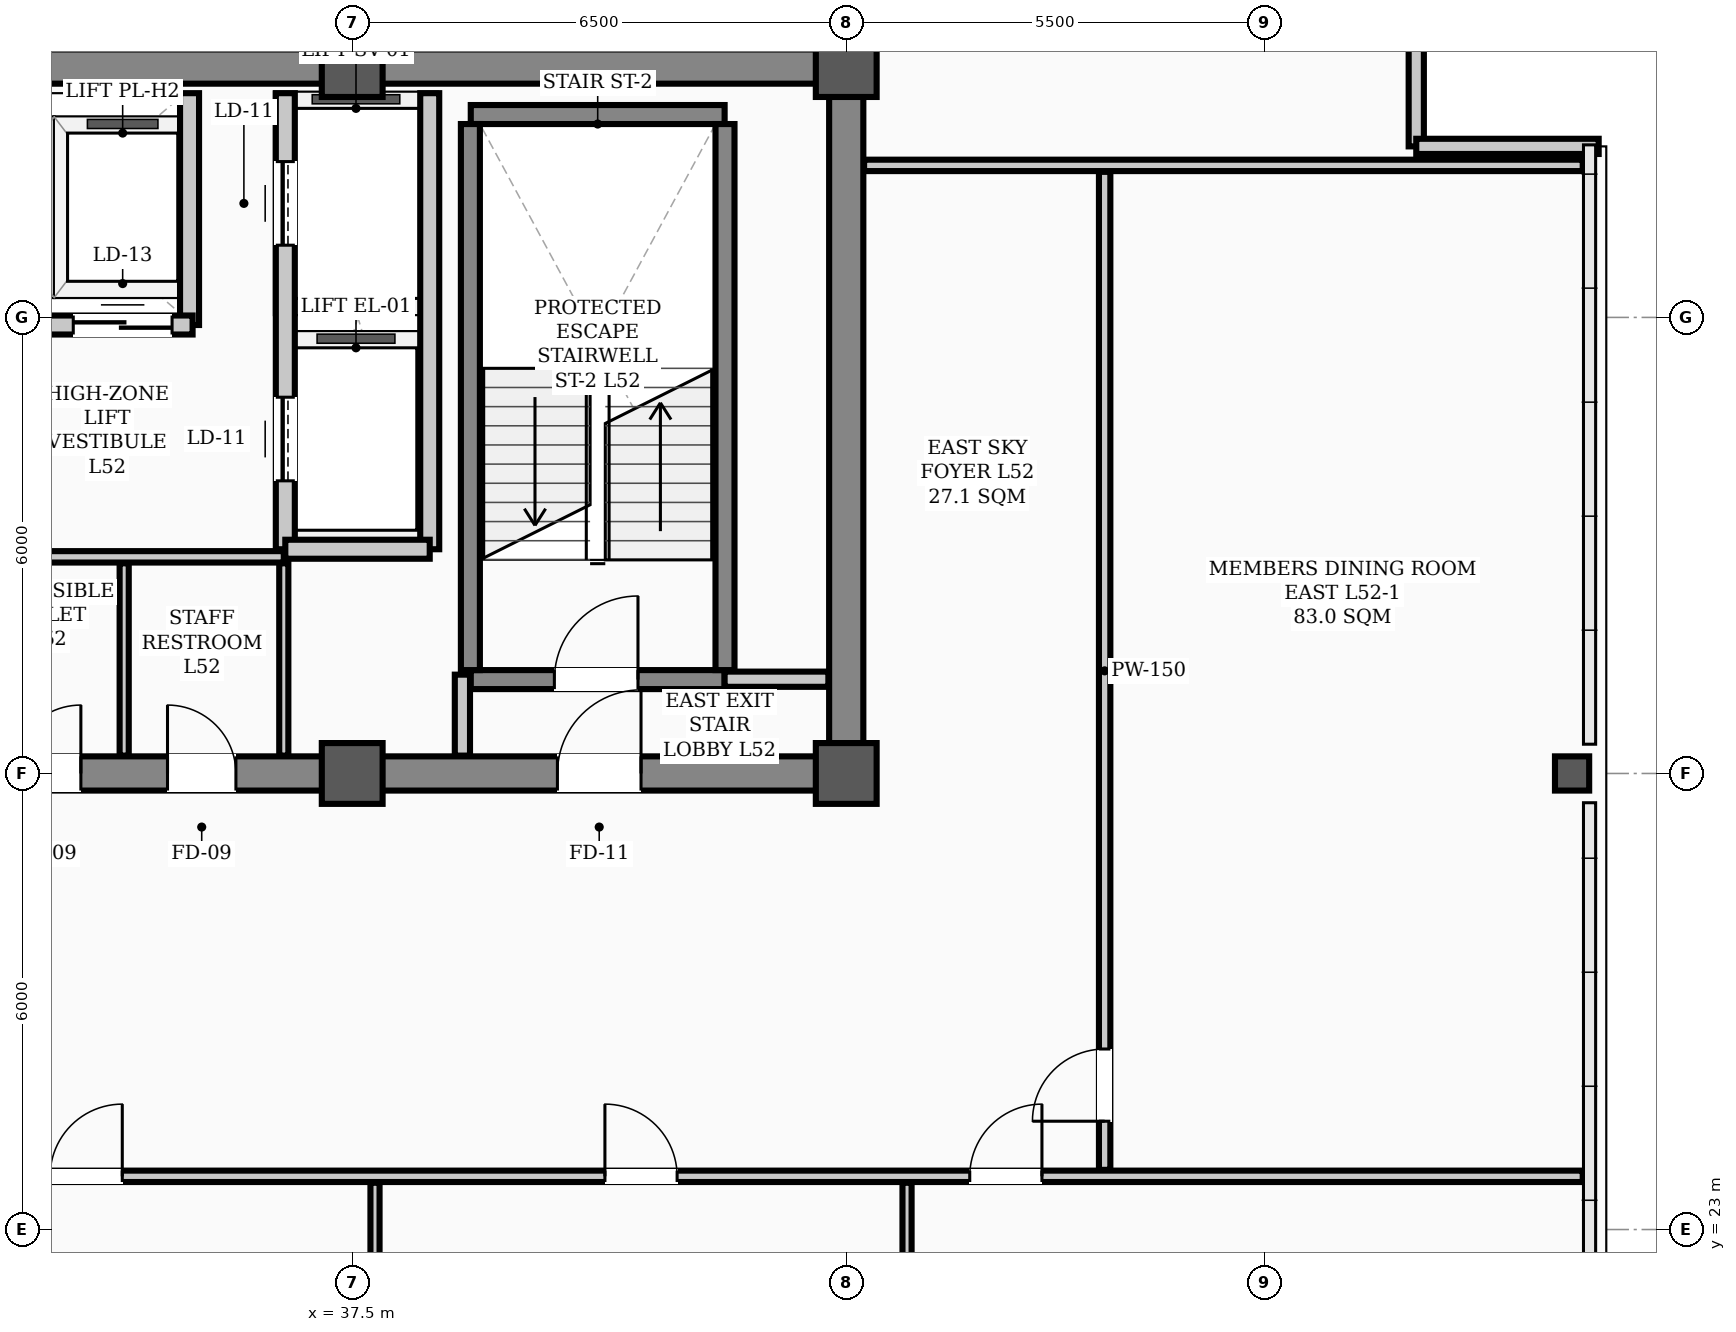
"""IFC4 building model, lengths in metres.
Left out: names, types, materials, properties, quantities, classifications, styles, units other than length and angle.
Written with IfcOpenShell. Run it as: python <this file> out.ifc"""

import sys

from ifc_helpers import new_model, si_unit, direction, frame, frame_2d, origin, origin_2d, place, context, subcontext, project, spatial, rectangle, hollow_rectangle, extrude, element, fill, save


model = new_model("IFC4")
c1 = context("Model", 3, precision=1e-05, world=origin(), true_north=direction((0.0, 1.0)))
c2 = subcontext(c1, "Body", "Model", "MODEL_VIEW")
j1 = project(units=[si_unit("LENGTHUNIT", "METRE"), si_unit("PLANEANGLEUNIT", "RADIAN")], contexts=[c1])
p1 = place(None, origin())
s1 = spatial("IfcSite", under=j1, at=p1, CompositionType="ELEMENT")
p2 = place(p1, origin())
s2 = spatial("IfcBuilding", under=s1, at=p2, CompositionType="ELEMENT")
p3 = place(p2, frame((0.0, 0.0, 211.1)))
s3 = spatial("IfcBuildingStorey", under=s2, at=p3, CompositionType="ELEMENT", Elevation=211.1)
for number, where, z_axis, x_axis in (
    (1, (37.5, 29.0, 0.0), (0.0, 0.0, 1.0), (1.0, 0.0, 0.0)),
    (2, (37.5, 38.3, 0.0), (0.0, 0.0, 1.0), (1.0, 0.0, 0.0)),
    (3, (44.0, 29.0, 0.0), (0.0, 0.0, 1.0), (1.0, 0.0, 0.0)),
    (4, (44.0, 38.3, 0.0), (0.0, 0.0, 1.0), (1.0, 0.0, 0.0)),
):
    element("IfcColumn", number, at=place(p3, frame(where, z_axis=z_axis, x_axis=x_axis)), inside=s3, PredefinedType="COLUMN", context=c2, shape_type="SweptSolid", body=[
        extrude(hollow_rectangle(XDim=0.8, YDim=0.8, WallThickness=0.032, InnerFilletRadius=0.016, OuterFilletRadius=0.048, at=origin_2d()), origin(), (0.0, 0.0, 1.0), 3.9),
    ])
p4 = place(p3, frame((53.55, 29.0, 0.0), z_axis=(0.0, 0.0, 1.0), x_axis=(1.0, 0.0, 0.0)))
e5 = element("IfcColumn", 5, at=p4, inside=s3, PredefinedType="COLUMN", context=c2, shape_type="SweptSolid", body=[
    extrude(hollow_rectangle(XDim=0.45, YDim=0.45, WallThickness=0.022, InnerFilletRadius=0.022, OuterFilletRadius=0.044, at=origin_2d()), origin(), (0.0, 0.0, 1.0), 3.9),
])
for number, where, z_axis, x_axis in (
    (6, (51.5, 39.65, 0.0), (0.0, 0.0, 1.0), (0.0, -1.0, 0.0)),
    (7, (51.5, 37.25, 0.0), (0.0, 0.0, 1.0), (1.0, 0.0, 0.0)),
):
    element("IfcWall", number, at=place(p3, frame(where, z_axis=z_axis, x_axis=x_axis)), inside=s3, PredefinedType="PARAPET", context=c2, shape_type="SweptSolid", body=[
        extrude(rectangle(XDim=2.4, YDim=0.2, at=frame_2d((1.2, 0.0))), origin(), (0.0, 0.0, 1.0), 1.2),
    ])
p5 = place(p3, frame((13.5, 29.0, 0.0), z_axis=(0.0, 0.0, 1.0), x_axis=(1.0, 0.0, 0.0)))
e8 = element("IfcWall", 8, at=p5, inside=s3, PredefinedType="SHEAR", context=c2, shape_type="SweptSolid", body=[
    extrude(rectangle(XDim=30.5, YDim=0.45, at=frame_2d((15.25, 0.0))), origin(), (0.0, 0.0, 1.0), 3.72),
])
p6 = place(p5, frame((1.75, 0.0, 0.0)))
e9 = element("IfcOpeningElement", 9, at=p6, cuts=e8, PredefinedType="OPENING", context=c2, shape_type="SweptSolid", body=[
    extrude(rectangle(XDim=1.1, YDim=2.08, at=frame_2d((0.55, 1.04))), frame((0.0, 0.235, 0.0), z_axis=(0.0, -1.0, 0.0), x_axis=(1.0, 0.0, 0.0)), (0.0, 0.0, 1.0), 0.47),
])
p7 = place(p5, frame((26.7, 0.0, 0.0)))
e10 = element("IfcOpeningElement", 10, at=p7, cuts=e8, PredefinedType="OPENING", context=c2, shape_type="SweptSolid", body=[
    extrude(rectangle(XDim=1.1, YDim=2.08, at=frame_2d((0.55, 1.04))), frame((0.0, 0.235, 0.0), z_axis=(0.0, -1.0, 0.0), x_axis=(1.0, 0.0, 0.0)), (0.0, 0.0, 1.0), 0.47),
])
p8 = place(p5, frame((6.8, 0.0, 0.0)))
e11 = element("IfcOpeningElement", 11, at=p8, cuts=e8, PredefinedType="OPENING", context=c2, shape_type="SweptSolid", body=[
    extrude(rectangle(XDim=1.1, YDim=2.08, at=frame_2d((0.55, 1.04))), frame((0.0, 0.235, 0.0), z_axis=(0.0, -1.0, 0.0), x_axis=(1.0, 0.0, 0.0)), (0.0, 0.0, 1.0), 0.47),
])
p9 = place(p5, frame((13.2, 0.0, 0.0)))
e12 = element("IfcOpeningElement", 12, at=p9, cuts=e8, PredefinedType="OPENING", context=c2, shape_type="SweptSolid", body=[
    extrude(rectangle(XDim=1.6, YDim=2.08, at=frame_2d((0.8, 1.04))), frame((0.0, 0.235, 0.0), z_axis=(0.0, -1.0, 0.0), x_axis=(1.0, 0.0, 0.0)), (0.0, 0.0, 1.0), 0.47),
])
p10 = place(p5, frame((19.53, 0.0, 0.0)))
e13 = element("IfcOpeningElement", 13, at=p10, cuts=e8, PredefinedType="OPENING", context=c2, shape_type="SweptSolid", body=[
    extrude(rectangle(XDim=0.9, YDim=2.08, at=frame_2d((0.45, 1.04))), frame((0.0, 0.235, 0.0), z_axis=(0.0, -1.0, 0.0), x_axis=(1.0, 0.0, 0.0)), (0.0, 0.0, 1.0), 0.47),
])
p11 = place(p5, frame((21.57, 0.0, 0.0)))
e14 = element("IfcOpeningElement", 14, at=p11, cuts=e8, PredefinedType="OPENING", context=c2, shape_type="SweptSolid", body=[
    extrude(rectangle(XDim=0.9, YDim=2.08, at=frame_2d((0.45, 1.04))), frame((0.0, 0.235, 0.0), z_axis=(0.0, -1.0, 0.0), x_axis=(1.0, 0.0, 0.0)), (0.0, 0.0, 1.0), 0.47),
])
p12 = place(p3, frame((13.5, 38.3, 0.0), z_axis=(0.0, 0.0, 1.0), x_axis=(1.0, 0.0, 0.0)))
e15 = element("IfcWall", 15, at=p12, inside=s3, PredefinedType="SHEAR", context=c2, shape_type="SweptSolid", body=[
    extrude(rectangle(XDim=30.5, YDim=0.45, at=frame_2d((15.25, 0.0))), origin(), (0.0, 0.0, 1.0), 3.72),
])
p13 = place(p3, frame((44.0, 29.35, 0.0), z_axis=(0.0, 0.0, 1.0), x_axis=(0.0, 1.0, 0.0)))
e16 = element("IfcWall", 16, at=p13, inside=s3, PredefinedType="SHEAR", context=c2, shape_type="SweptSolid", body=[
    extrude(rectangle(XDim=8.6, YDim=0.45, at=frame_2d((4.3, 0.0))), origin(), (0.0, 0.0, 1.0), 3.72),
])
p14 = place(p3, frame((39.06, 30.235, 0.0), z_axis=(0.0, 0.0, 1.0), x_axis=(1.0, 0.0, 0.0)))
e17 = element("IfcWall", 17, at=p14, inside=s3, PredefinedType="STANDARD", context=c2, shape_type="SweptSolid", body=[
    extrude(rectangle(XDim=3.34, YDim=0.25, at=frame_2d((1.67, 0.0))), origin(), (0.0, 0.0, 1.0), 3.72),
])
p15 = place(p14, frame((1.1, 0.0, 0.0)))
e18 = element("IfcOpeningElement", 18, at=p15, cuts=e17, PredefinedType="OPENING", context=c2, shape_type="SweptSolid", body=[
    extrude(rectangle(XDim=1.1, YDim=2.08, at=frame_2d((0.55, 1.04))), frame((0.0, 0.135, 0.0), z_axis=(0.0, -1.0, 0.0), x_axis=(1.0, 0.0, 0.0)), (0.0, 0.0, 1.0), 0.27),
])
p16 = place(p3, frame((39.06, 37.669, 0.0), z_axis=(0.0, 0.0, 1.0), x_axis=(1.0, 0.0, 0.0)))
e19 = element("IfcWall", 19, at=p16, inside=s3, PredefinedType="STANDARD", context=c2, shape_type="SweptSolid", body=[
    extrude(rectangle(XDim=3.34, YDim=0.25, at=frame_2d((1.67, 0.0))), origin(), (0.0, 0.0, 1.0), 3.72),
])
for number, where, z_axis, x_axis in (
    (20, (39.055, 30.36, 0.0), (0.0, 0.0, 1.0), (0.0, 1.0, 0.0)),
    (21, (42.405, 30.36, 0.0), (0.0, 0.0, 1.0), (0.0, 1.0, 0.0)),
):
    element("IfcWall", number, at=place(p3, frame(where, z_axis=z_axis, x_axis=x_axis)), inside=s3, PredefinedType="STANDARD", context=c2, shape_type="SweptSolid", body=[
        extrude(rectangle(XDim=7.184, YDim=0.25, at=frame_2d((3.592, 0.0))), origin(), (0.0, 0.0, 1.0), 3.72),
    ])
p17 = place(p3, frame((36.62, 31.95, 0.0), z_axis=(0.0, 0.0, 1.0), x_axis=(0.0, 1.0, 0.0)))
e22 = element("IfcWall", 22, at=p17, inside=s3, PredefinedType="STANDARD", context=c2, shape_type="SweptSolid", body=[
    extrude(rectangle(XDim=6.0, YDim=0.25, at=frame_2d((3.0, 0.0))), origin(), (0.0, 0.0, 1.0), 3.72),
])
p18 = place(p17, frame((0.9, 0.0, 0.0)))
e23 = element("IfcOpeningElement", 23, at=p18, cuts=e22, PredefinedType="OPENING", context=c2, shape_type="SweptSolid", body=[
    extrude(rectangle(XDim=1.1, YDim=2.08, at=frame_2d((0.55, 1.04))), frame((0.0, 0.135, 0.0), z_axis=(0.0, -1.0, 0.0), x_axis=(1.0, 0.0, 0.0)), (0.0, 0.0, 1.0), 0.27),
])
p19 = place(p17, frame((4.0, 0.0, 0.0)))
e24 = element("IfcOpeningElement", 24, at=p19, cuts=e22, PredefinedType="OPENING", context=c2, shape_type="SweptSolid", body=[
    extrude(rectangle(XDim=1.1, YDim=2.08, at=frame_2d((0.55, 1.04))), frame((0.0, 0.135, 0.0), z_axis=(0.0, -1.0, 0.0), x_axis=(1.0, 0.0, 0.0)), (0.0, 0.0, 1.0), 0.27),
])
p20 = place(p3, frame((38.52, 31.95, 0.0), z_axis=(0.0, 0.0, 1.0), x_axis=(0.0, 1.0, 0.0)))
e25 = element("IfcWall", 25, at=p20, inside=s3, PredefinedType="STANDARD", context=c2, shape_type="SweptSolid", body=[
    extrude(rectangle(XDim=6.0, YDim=0.25, at=frame_2d((3.0, 0.0))), origin(), (0.0, 0.0, 1.0), 3.48),
])
p21 = place(p3, frame((36.62, 31.95, 0.0), z_axis=(0.0, 0.0, 1.0), x_axis=(1.0, 0.0, 0.0)))
e26 = element("IfcWall", 26, at=p21, inside=s3, PredefinedType="STANDARD", context=c2, shape_type="SweptSolid", body=[
    extrude(rectangle(XDim=1.9, YDim=0.25, at=frame_2d((0.95, 0.0))), origin(), (0.0, 0.0, 1.0), 3.48),
])
p22 = place(p3, frame((35.36, 34.9, 0.0), z_axis=(0.0, 0.0, 1.0), x_axis=(0.0, 1.0, 0.0)))
e27 = element("IfcWall", 27, at=p22, inside=s3, PredefinedType="STANDARD", context=c2, shape_type="SweptSolid", body=[
    extrude(rectangle(XDim=3.05, YDim=0.25, at=frame_2d((1.525, 0.0))), origin(), (0.0, 0.0, 1.0), 3.72),
])
p23 = place(p3, frame((31.8, 34.9, 0.0), z_axis=(0.0, 0.0, 1.0), x_axis=(1.0, 0.0, 0.0)))
e28 = element("IfcWall", 28, at=p23, inside=s3, PredefinedType="STANDARD", context=c2, shape_type="SweptSolid", body=[
    extrude(rectangle(XDim=3.6, YDim=0.25, at=frame_2d((1.8, 0.0))), origin(), (0.0, 0.0, 1.0), 3.72),
])
p24 = place(p23, frame((0.23, 0.0, 0.0)))
e29 = element("IfcOpeningElement", 29, at=p24, cuts=e28, PredefinedType="OPENING", context=c2, shape_type="SweptSolid", body=[
    extrude(rectangle(XDim=1.3, YDim=2.08, at=frame_2d((0.65, 1.04))), frame((0.0, 0.135, 0.0), z_axis=(0.0, -1.0, 0.0), x_axis=(1.0, 0.0, 0.0)), (0.0, 0.0, 1.0), 0.27),
])
p25 = place(p23, frame((2.03, 0.0, 0.0)))
e30 = element("IfcOpeningElement", 30, at=p25, cuts=e28, PredefinedType="OPENING", context=c2, shape_type="SweptSolid", body=[
    extrude(rectangle(XDim=1.3, YDim=2.08, at=frame_2d((0.65, 1.04))), frame((0.0, 0.135, 0.0), z_axis=(0.0, -1.0, 0.0), x_axis=(1.0, 0.0, 0.0)), (0.0, 0.0, 1.0), 0.27),
])
p26 = place(p3, frame((42.4, 30.24, 0.0), z_axis=(0.0, 0.0, 1.0), x_axis=(1.0, 0.0, 0.0)))
e31 = element("IfcWall", 31, at=p26, inside=s3, PredefinedType="STANDARD", context=c2, shape_type="SweptSolid", body=[
    extrude(rectangle(XDim=1.365, YDim=0.2, at=frame_2d((0.683, 0.0))), origin(), (0.0, 0.0, 1.0), 3.2),
])
p27 = place(p3, frame((32.5, 31.85, 0.0), z_axis=(0.0, 0.0, 1.0), x_axis=(1.0, 0.0, 0.0)))
e32 = element("IfcWall", 32, at=p27, inside=s3, PredefinedType="PARTITIONING", context=c2, shape_type="SweptSolid", body=[
    extrude(rectangle(XDim=4.1, YDim=0.15, at=frame_2d((2.05, 0.0))), origin(), (0.0, 0.0, 1.0), 3.72),
])
p28 = place(p3, frame((10.31, 23.7, 0.0), z_axis=(0.0, 0.0, 1.0), x_axis=(1.0, 0.0, 0.0)))
e33 = element("IfcWall", 33, at=p28, inside=s3, PredefinedType="PARTITIONING", context=c2, shape_type="SweptSolid", body=[
    extrude(rectangle(XDim=43.38, YDim=0.15, at=frame_2d((21.69, 0.0))), origin(), (0.0, 0.0, 1.0), 3.2),
])
p29 = place(p28, frame((0.57, 0.0, 0.0)))
e34 = element("IfcOpeningElement", 34, at=p29, cuts=e33, PredefinedType="OPENING", context=c2, shape_type="SweptSolid", body=[
    extrude(rectangle(XDim=0.95, YDim=2.08, at=frame_2d((0.475, 1.04))), frame((0.0, 0.085, 0.0), z_axis=(0.0, -1.0, 0.0), x_axis=(1.0, 0.0, 0.0)), (0.0, 0.0, 1.0), 0.17),
])
p30 = place(p28, frame((7.115, 0.0, 0.0)))
e35 = element("IfcOpeningElement", 35, at=p30, cuts=e33, PredefinedType="OPENING", context=c2, shape_type="SweptSolid", body=[
    extrude(rectangle(XDim=0.95, YDim=2.08, at=frame_2d((0.475, 1.04))), frame((0.0, 0.085, 0.0), z_axis=(0.0, -1.0, 0.0), x_axis=(1.0, 0.0, 0.0)), (0.0, 0.0, 1.0), 0.17),
])
p31 = place(p28, frame((15.115, 0.0, 0.0)))
e36 = element("IfcOpeningElement", 36, at=p31, cuts=e33, PredefinedType="OPENING", context=c2, shape_type="SweptSolid", body=[
    extrude(rectangle(XDim=0.95, YDim=2.08, at=frame_2d((0.475, 1.04))), frame((0.0, 0.085, 0.0), z_axis=(0.0, -1.0, 0.0), x_axis=(1.0, 0.0, 0.0)), (0.0, 0.0, 1.0), 0.17),
])
p32 = place(p28, frame((23.215, 0.0, 0.0)))
e37 = element("IfcOpeningElement", 37, at=p32, cuts=e33, PredefinedType="OPENING", context=c2, shape_type="SweptSolid", body=[
    extrude(rectangle(XDim=0.95, YDim=2.08, at=frame_2d((0.475, 1.04))), frame((0.0, 0.085, 0.0), z_axis=(0.0, -1.0, 0.0), x_axis=(1.0, 0.0, 0.0)), (0.0, 0.0, 1.0), 0.17),
])
p33 = place(p28, frame((30.515, 0.0, 0.0)))
e38 = element("IfcOpeningElement", 38, at=p33, cuts=e33, PredefinedType="OPENING", context=c2, shape_type="SweptSolid", body=[
    extrude(rectangle(XDim=0.95, YDim=2.08, at=frame_2d((0.475, 1.04))), frame((0.0, 0.085, 0.0), z_axis=(0.0, -1.0, 0.0), x_axis=(1.0, 0.0, 0.0)), (0.0, 0.0, 1.0), 0.17),
])
p34 = place(p28, frame((35.315, 0.0, 0.0)))
e39 = element("IfcOpeningElement", 39, at=p34, cuts=e33, PredefinedType="OPENING", context=c2, shape_type="SweptSolid", body=[
    extrude(rectangle(XDim=0.95, YDim=2.08, at=frame_2d((0.475, 1.04))), frame((0.0, 0.085, 0.0), z_axis=(0.0, -1.0, 0.0), x_axis=(1.0, 0.0, 0.0)), (0.0, 0.0, 1.0), 0.17),
])
p35 = place(p3, frame((44.235, 37.0, 0.0), z_axis=(0.0, 0.0, 1.0), x_axis=(1.0, 0.0, 0.0)))
e40 = element("IfcWall", 40, at=p35, inside=s3, PredefinedType="PARTITIONING", context=c2, shape_type="SweptSolid", body=[
    extrude(rectangle(XDim=9.455, YDim=0.15, at=frame_2d((4.728, 0.0))), origin(), (0.0, 0.0, 1.0), 3.2),
])
p36 = place(p3, frame((38.95, 29.235, 0.0), z_axis=(0.0, 0.0, 1.0), x_axis=(0.0, 1.0, 0.0)))
e41 = element("IfcWall", 41, at=p36, inside=s3, PredefinedType="STANDARD", context=c2, shape_type="SweptSolid", body=[
    extrude(rectangle(XDim=1.065, YDim=0.2, at=frame_2d((0.532, 0.0))), origin(), (0.0, 0.0, 1.0), 3.35),
])
for number, where, z_axis, x_axis in (
    (42, (36.6, 29.235, 0.0), (0.0, 0.0, 1.0), (0.0, 1.0, 0.0)),
    (43, (34.5, 29.235, 0.0), (0.0, 0.0, 1.0), (0.0, 1.0, 0.0)),
):
    element("IfcWall", number, at=place(p3, frame(where, z_axis=z_axis, x_axis=x_axis)), inside=s3, PredefinedType="PARTITIONING", context=c2, shape_type="SweptSolid", body=[
        extrude(rectangle(XDim=2.53, YDim=0.12, at=frame_2d((1.265, 0.0))), origin(), (0.0, 0.0, 1.0), 3.35),
    ])
p37 = place(p3, frame((47.4, 23.785, 0.0), z_axis=(0.0, 0.0, 1.0), x_axis=(0.0, 1.0, 0.0)))
e44 = element("IfcWall", 44, at=p37, inside=s3, PredefinedType="PARTITIONING", context=c2, shape_type="SweptSolid", body=[
    extrude(rectangle(XDim=13.13, YDim=0.15, at=frame_2d((6.565, 0.0))), origin(), (0.0, 0.0, 1.0), 3.1),
])
p38 = place(p37, frame((0.64, 0.0, 0.0)))
e45 = element("IfcOpeningElement", 45, at=p38, cuts=e44, PredefinedType="OPENING", context=c2, shape_type="SweptSolid", body=[
    extrude(rectangle(XDim=0.95, YDim=2.08, at=frame_2d((0.475, 1.04))), frame((0.0, 0.085, 0.0), z_axis=(0.0, -1.0, 0.0), x_axis=(1.0, 0.0, 0.0)), (0.0, 0.0, 1.0), 0.17),
])
for number, where, z_axis, x_axis in (
    (46, (37.8, 11.56, 0.0), (0.0, 0.0, 1.0), (0.0, 1.0, 0.0)),
    (47, (44.8, 11.56, 0.0), (0.0, 0.0, 1.0), (0.0, 1.0, 0.0)),
):
    element("IfcWall", number, at=place(p3, frame(where, z_axis=z_axis, x_axis=x_axis)), inside=s3, PredefinedType="PARTITIONING", context=c2, shape_type="SweptSolid", body=[
        extrude(rectangle(XDim=12.055, YDim=0.12, at=frame_2d((6.027, 0.0))), origin(), (0.0, 0.0, 1.0), 3.1),
    ])
p39 = place(p15, origin())
e48 = element("IfcDoor", 48, at=p39, inside=s3, OperationType="SINGLE_SWING_RIGHT", PredefinedType="DOOR", context=c2, shape_type="SweptSolid", body=[
    extrude(rectangle(XDim=1.1, YDim=2.08, at=frame_2d((0.55, 1.04))), frame((0.0, 0.025, 0.0), z_axis=(0.0, -1.0, 0.0), x_axis=(1.0, 0.0, 0.0)), (0.0, 0.0, 1.0), 0.05),
])
fill(e18, e48)
p40 = place(p7, origin())
e49 = element("IfcDoor", 49, at=p40, inside=s3, OperationType="SINGLE_SWING_RIGHT", PredefinedType="DOOR", context=c2, shape_type="SweptSolid", body=[
    extrude(rectangle(XDim=1.1, YDim=2.08, at=frame_2d((0.55, 1.04))), frame((0.0, 0.025, 0.0), z_axis=(0.0, -1.0, 0.0), x_axis=(1.0, 0.0, 0.0)), (0.0, 0.0, 1.0), 0.05),
])
fill(e10, e49)
p41 = place(p10, origin())
e50 = element("IfcDoor", 50, at=p41, inside=s3, OperationType="SINGLE_SWING_RIGHT", PredefinedType="DOOR", context=c2, shape_type="SweptSolid", body=[
    extrude(rectangle(XDim=0.9, YDim=2.08, at=frame_2d((0.45, 1.04))), frame((0.0, 0.025, 0.0), z_axis=(0.0, -1.0, 0.0), x_axis=(1.0, 0.0, 0.0)), (0.0, 0.0, 1.0), 0.05),
])
fill(e13, e50)
p42 = place(p11, origin())
e51 = element("IfcDoor", 51, at=p42, inside=s3, OperationType="SINGLE_SWING_LEFT", PredefinedType="DOOR", context=c2, shape_type="SweptSolid", body=[
    extrude(rectangle(XDim=0.9, YDim=2.08, at=frame_2d((0.45, 1.04))), frame((0.0, 0.025, 0.0), z_axis=(0.0, -1.0, 0.0), x_axis=(1.0, 0.0, 0.0)), (0.0, 0.0, 1.0), 0.05),
])
fill(e14, e51)
p43 = place(p32, origin())
e52 = element("IfcDoor", 52, at=p43, inside=s3, OperationType="SINGLE_SWING_RIGHT", PredefinedType="DOOR", context=c2, shape_type="SweptSolid", body=[
    extrude(rectangle(XDim=0.95, YDim=2.08, at=frame_2d((0.475, 1.04))), frame((0.0, 0.025, 0.0), z_axis=(0.0, -1.0, 0.0), x_axis=(1.0, 0.0, 0.0)), (0.0, 0.0, 1.0), 0.05),
])
fill(e37, e52)
p44 = place(p33, origin())
e53 = element("IfcDoor", 53, at=p44, inside=s3, OperationType="SINGLE_SWING_LEFT", PredefinedType="DOOR", context=c2, shape_type="SweptSolid", body=[
    extrude(rectangle(XDim=0.95, YDim=2.08, at=frame_2d((0.475, 1.04))), frame((0.0, 0.025, 0.0), z_axis=(0.0, -1.0, 0.0), x_axis=(1.0, 0.0, 0.0)), (0.0, 0.0, 1.0), 0.05),
])
fill(e38, e53)
p45 = place(p34, origin())
e54 = element("IfcDoor", 54, at=p45, inside=s3, OperationType="SINGLE_SWING_RIGHT", PredefinedType="DOOR", context=c2, shape_type="SweptSolid", body=[
    extrude(rectangle(XDim=0.95, YDim=2.08, at=frame_2d((0.475, 1.04))), frame((0.0, 0.025, 0.0), z_axis=(0.0, -1.0, 0.0), x_axis=(1.0, 0.0, 0.0)), (0.0, 0.0, 1.0), 0.05),
])
fill(e39, e54)
p46 = place(p38, origin())
e55 = element("IfcDoor", 55, at=p46, inside=s3, OperationType="SINGLE_SWING_LEFT", PredefinedType="DOOR", context=c2, shape_type="SweptSolid", body=[
    extrude(rectangle(XDim=0.95, YDim=2.08, at=frame_2d((0.475, 1.04))), frame((0.0, 0.025, 0.0), z_axis=(0.0, -1.0, 0.0), x_axis=(1.0, 0.0, 0.0)), (0.0, 0.0, 1.0), 0.05),
])
fill(e45, e55)
p47 = place(p18, origin())
e56 = element("IfcDoor", 56, at=p47, inside=s3, OperationType="SLIDING_TO_LEFT", PredefinedType="DOOR", context=c2, shape_type="SweptSolid", body=[
    extrude(rectangle(XDim=1.1, YDim=2.08, at=frame_2d((0.55, 1.04))), frame((0.0, 0.025, 0.0), z_axis=(0.0, -1.0, 0.0), x_axis=(1.0, 0.0, 0.0)), (0.0, 0.0, 1.0), 0.05),
])
fill(e23, e56)
p48 = place(p19, origin())
e57 = element("IfcDoor", 57, at=p48, inside=s3, OperationType="SLIDING_TO_LEFT", PredefinedType="DOOR", context=c2, shape_type="SweptSolid", body=[
    extrude(rectangle(XDim=1.1, YDim=2.08, at=frame_2d((0.55, 1.04))), frame((0.0, 0.025, 0.0), z_axis=(0.0, -1.0, 0.0), x_axis=(1.0, 0.0, 0.0)), (0.0, 0.0, 1.0), 0.05),
])
fill(e24, e57)
p49 = place(p25, origin())
e58 = element("IfcDoor", 58, at=p49, inside=s3, OperationType="DOUBLE_DOOR_SLIDING", PredefinedType="DOOR", context=c2, shape_type="SweptSolid", body=[
    extrude(rectangle(XDim=1.3, YDim=2.08, at=frame_2d((0.65, 1.04))), frame((0.0, 0.025, 0.0), z_axis=(0.0, -1.0, 0.0), x_axis=(1.0, 0.0, 0.0)), (0.0, 0.0, 1.0), 0.05),
])
fill(e30, e58)
save(model, sys.argv[1])
